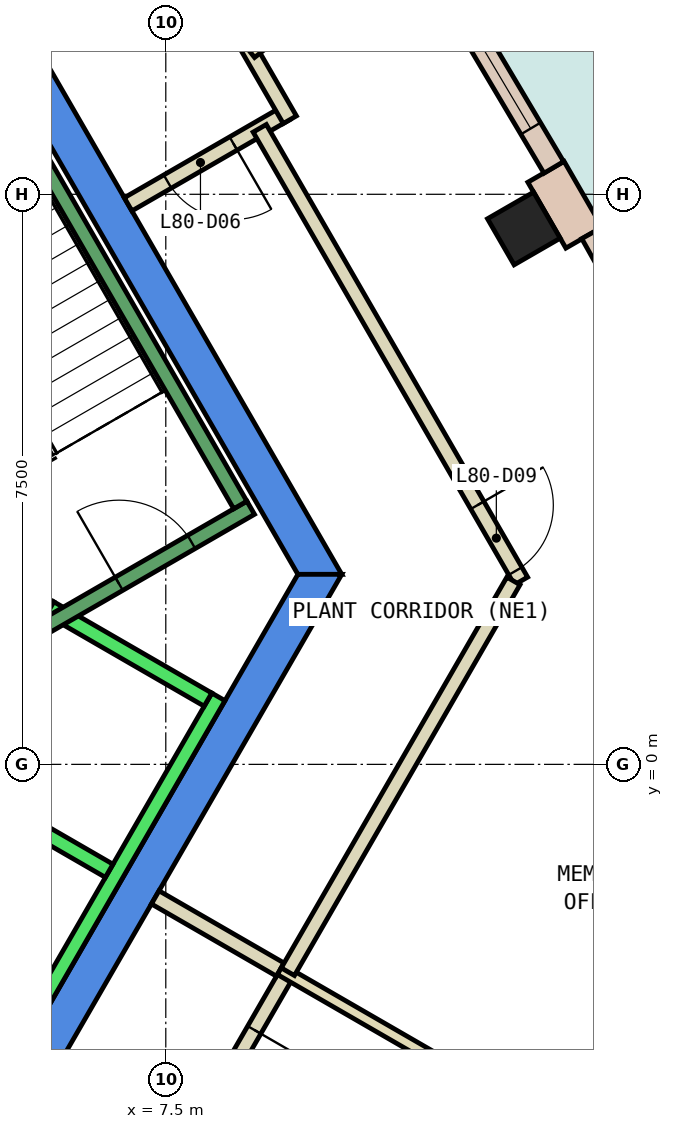
"""IFC4 building model, lengths in metres.
Left out: names, types, materials, properties, quantities, classifications, styles, units other than length and angle.
Written with IfcOpenShell. Run it as: python <this file> out.ifc"""

import sys

from ifc_helpers import new_model, si_unit, direction, frame, frame_2d, origin, origin_2d, place, context, subcontext, project, spatial, polyline, rectangle, outline, extrude, element, fill, save


model = new_model("IFC4")
c1 = context("Model", 3, precision=1e-05, world=origin(), true_north=direction((0.0, 1.0)))
c2 = subcontext(c1, "Body", "Model", "MODEL_VIEW")
j1 = project(units=[si_unit("LENGTHUNIT", "METRE"), si_unit("PLANEANGLEUNIT", "RADIAN")], contexts=[c1])
p1 = place(None, origin())
s1 = spatial("IfcSite", under=j1, at=p1, CompositionType="ELEMENT")
p2 = place(p1, origin())
s2 = spatial("IfcBuilding", under=s1, at=p2, CompositionType="ELEMENT")
p3 = place(p2, frame((0.0, 0.0, 340.4)))
s3 = spatial("IfcBuildingStorey", under=s2, at=p3, CompositionType="ELEMENT", Elevation=340.4)
p4 = place(p3, frame((12.211, 7.05, 0.0), z_axis=(0.0, 0.0, 1.0), x_axis=(-0.5, 0.866025403784, 0.0)))
e1 = element("IfcColumn", 1, at=p4, inside=s3, PredefinedType="COLUMN", context=c2, shape_type="SweptSolid", body=[
    extrude(rectangle(XDim=0.7, YDim=0.7, at=origin_2d()), origin(), (0.0, 0.0, 1.0), 4.15),
])
p5 = place(p3, frame((0.0, 0.0, -0.45)))
e2 = element("IfcWall", 2, at=p5, inside=s3, PredefinedType="SHEAR", context=c2, shape_type="SweptSolid", body=[
    extrude(outline(polyline([(5.486, 9.998), (5.053, 9.748), (9.238, 2.5), (9.815, 2.5), (5.486, 9.998)])), origin(), (0.0, 0.0, 1.0), 4.6),
])
p6 = place(p3, frame((0.0, 0.0, -0.45)))
e3 = element("IfcWall", 3, at=p6, inside=s3, PredefinedType="SHEAR", context=c2, shape_type="SweptSolid", body=[
    extrude(outline(polyline([(4.907, -6.0), (9.815, 2.5), (9.238, 2.5), (4.619, -5.5), (4.907, -6.0)])), origin(), (0.0, 0.0, 1.0), 4.6),
])
p7 = place(p3, frame((13.002, 6.929, 0.0), z_axis=(0.0, 0.0, 1.0), x_axis=(-0.49960277677, 0.866254619292, 0.0)))
e4 = element("IfcWall", 4, at=p7, inside=s3, PredefinedType="STANDARD", context=c2, shape_type="SweptSolid", body=[
    extrude(rectangle(XDim=1.001, YDim=0.55, at=frame_2d((0.5, 0.0))), origin(), (0.0, 0.0, 1.0), 4.15),
])
p8 = place(p3, frame((16.225, 1.426, 0.0), z_axis=(0.0, 0.0, 1.0), x_axis=(-0.489232514948, 0.872153396094, 0.0)))
e5 = element("IfcWall", 5, at=p8, inside=s3, PredefinedType="STANDARD", context=c2, shape_type="SweptSolid", body=[
    extrude(rectangle(XDim=6.38, YDim=0.3, at=frame_2d((3.19, 0.0))), origin(), (0.0, 0.0, 1.0), 4.15),
])
p9 = place(p8, frame((0.595, 0.0, 0.0)))
e6 = element("IfcOpeningElement", 6, at=p9, cuts=e5, PredefinedType="OPENING", context=c2, shape_type="SweptSolid", body=[
    extrude(rectangle(XDim=2.0, YDim=2.4, at=frame_2d((1.0, 1.2))), frame((0.0, 0.16, 0.0), z_axis=(0.0, -1.0, 0.0), x_axis=(1.0, 0.0, 0.0)), (0.0, 0.0, 1.0), 0.32),
])
p10 = place(p8, frame((3.785, 0.0, 0.9)))
e7 = element("IfcOpeningElement", 7, at=p10, cuts=e5, PredefinedType="OPENING", context=c2, shape_type="SweptSolid", body=[
    extrude(rectangle(XDim=2.0, YDim=3.0, at=frame_2d((1.0, 1.5))), frame((0.0, 0.16, 0.0), z_axis=(0.0, -1.0, 0.0), x_axis=(1.0, 0.0, 0.0)), (0.0, 0.0, 1.0), 0.32),
])
p11 = place(p3, frame((12.605, 7.854, 0.0), z_axis=(0.0, 0.0, 1.0), x_axis=(-0.510686403068, 0.859767060152, 0.0)))
e8 = element("IfcWall", 8, at=p11, inside=s3, PredefinedType="STANDARD", context=c2, shape_type="SweptSolid", body=[
    extrude(rectangle(XDim=6.38, YDim=0.3, at=frame_2d((3.19, 0.0))), origin(), (0.0, 0.0, 1.0), 4.15),
])
p12 = place(p11, frame((0.595, 0.0, 0.9)))
e9 = element("IfcOpeningElement", 9, at=p12, cuts=e8, PredefinedType="OPENING", context=c2, shape_type="SweptSolid", body=[
    extrude(rectangle(XDim=2.0, YDim=3.0, at=frame_2d((1.0, 1.5))), frame((0.0, 0.16, 0.0), z_axis=(0.0, -1.0, 0.0), x_axis=(1.0, 0.0, 0.0)), (0.0, 0.0, 1.0), 0.32),
])
p13 = place(p11, frame((3.785, 0.0, 0.9)))
e10 = element("IfcOpeningElement", 10, at=p13, cuts=e8, PredefinedType="OPENING", context=c2, shape_type="SweptSolid", body=[
    extrude(rectangle(XDim=2.0, YDim=3.0, at=frame_2d((1.0, 1.5))), frame((0.0, 0.16, 0.0), z_axis=(0.0, -1.0, 0.0), x_axis=(1.0, 0.0, 0.0)), (0.0, 0.0, 1.0), 0.32),
])
p14 = place(p3, frame((9.106, -2.728, 0.0), z_axis=(0.0, 0.0, 1.0), x_axis=(-0.500132879116, -0.865948672398, 0.0)))
e11 = element("IfcWall", 11, at=p14, inside=s3, PredefinedType="PARTITIONING", context=c2, shape_type="SweptSolid", body=[
    extrude(rectangle(XDim=3.879, YDim=0.2, at=frame_2d((1.939, 0.0))), origin(), (0.0, 0.0, 1.0), 4.15),
])
p15 = place(p14, frame((0.884, 0.0, 0.0)))
e12 = element("IfcOpeningElement", 12, at=p15, cuts=e11, PredefinedType="OPENING", context=c2, shape_type="SweptSolid", body=[
    extrude(rectangle(XDim=1.0, YDim=2.1, at=frame_2d((0.5, 1.05))), frame((0.0, 0.11, 0.0), z_axis=(0.0, -1.0, 0.0), x_axis=(1.0, 0.0, 0.0)), (0.0, 0.0, 1.0), 0.22),
])
p16 = place(p3, frame((7.361, -1.75, 0.0), z_axis=(0.0, 0.0, 1.0), x_axis=(0.865980106173, -0.500078449558, 0.0)))
e13 = element("IfcWall", 13, at=p16, inside=s3, PredefinedType="PARTITIONING", context=c2, shape_type="SweptSolid", body=[
    extrude(rectangle(XDim=1.9, YDim=0.2, at=frame_2d((0.95, 0.0))), origin(), (0.0, 0.0, 1.0), 4.15),
])
p17 = place(p3, frame((19.664, -8.853, 0.0), z_axis=(0.0, 0.0, 1.0), x_axis=(-0.866035935173, 0.499981758657, 0.0)))
e14 = element("IfcWall", 14, at=p17, inside=s3, PredefinedType="PARTITIONING", context=c2, shape_type="SweptSolid", body=[
    extrude(rectangle(XDim=12.307, YDim=0.15, at=frame_2d((6.153, 0.0))), origin(), (0.0, 0.0, 1.0), 4.15),
])
p18 = place(p3, frame((9.082, 8.568, 0.0), z_axis=(0.0, 0.0, 1.0), x_axis=(-0.865955154139, -0.50012165622, 0.0)))
e15 = element("IfcWall", 15, at=p18, inside=s3, PredefinedType="PARTITIONING", context=c2, shape_type="SweptSolid", body=[
    extrude(rectangle(XDim=2.4, YDim=0.2, at=frame_2d((1.2, 0.0))), origin(), (0.0, 0.0, 1.0), 4.15),
])
p19 = place(p18, frame((0.8, 0.0, 0.0)))
e16 = element("IfcOpeningElement", 16, at=p19, cuts=e15, PredefinedType="OPENING", context=c2, shape_type="SweptSolid", body=[
    extrude(rectangle(XDim=1.0, YDim=2.1, at=frame_2d((0.5, 1.05))), frame((0.0, 0.11, 0.0), z_axis=(0.0, -1.0, 0.0), x_axis=(1.0, 0.0, 0.0)), (0.0, 0.0, 1.0), 0.22),
])
p20 = place(p3, frame((5.532, 14.717, 0.0), z_axis=(0.0, 0.0, 1.0), x_axis=(0.499968011863, -0.866043871356, 0.0)))
e17 = element("IfcWall", 17, at=p20, inside=s3, PredefinedType="PARTITIONING", context=c2, shape_type="SweptSolid", body=[
    extrude(rectangle(XDim=7.201, YDim=0.2, at=frame_2d((3.6, 0.0))), origin(), (0.0, 0.0, 1.0), 4.15),
])
p21 = place(p20, frame((3.18, 0.0, 0.0)))
e18 = element("IfcOpeningElement", 18, at=p21, cuts=e17, PredefinedType="OPENING", context=c2, shape_type="SweptSolid", body=[
    extrude(rectangle(XDim=1.0, YDim=2.1, at=frame_2d((0.5, 1.05))), frame((0.0, 0.11, 0.0), z_axis=(0.0, -1.0, 0.0), x_axis=(1.0, 0.0, 0.0)), (0.0, 0.0, 1.0), 0.22),
])
p22 = place(p3, frame((8.736, 8.368, 0.0), z_axis=(0.0, 0.0, 1.0), x_axis=(0.499995994493, -0.866027716353, 0.0)))
e19 = element("IfcWall", 19, at=p22, inside=s3, PredefinedType="PARTITIONING", context=c2, shape_type="SweptSolid", body=[
    extrude(rectangle(XDim=6.876, YDim=0.2, at=frame_2d((3.438, 0.0))), origin(), (0.0, 0.0, 1.0), 4.15),
])
p23 = place(p22, frame((5.726, 0.0, 0.0)))
e20 = element("IfcOpeningElement", 20, at=p23, cuts=e19, PredefinedType="OPENING", context=c2, shape_type="SweptSolid", body=[
    extrude(rectangle(XDim=1.0, YDim=2.1, at=frame_2d((0.5, 1.05))), frame((0.0, 0.11, 0.0), z_axis=(0.0, -1.0, 0.0), x_axis=(1.0, 0.0, 0.0)), (0.0, 0.0, 1.0), 0.22),
])
p24 = place(p3, frame((12.074, 2.413, 0.0), z_axis=(0.0, 0.0, 1.0), x_axis=(-0.499974029402, -0.866040397397, 0.0)))
e21 = element("IfcWall", 21, at=p24, inside=s3, PredefinedType="PARTITIONING", context=c2, shape_type="SweptSolid", body=[
    extrude(rectangle(XDim=5.936, YDim=0.2, at=frame_2d((2.968, 0.0))), origin(), (0.0, 0.0, 1.0), 4.15),
])
p25 = place(p3, frame((10.617, 10.906, 0.0), z_axis=(0.0, 0.0, 1.0), x_axis=(-0.784159528351, -0.620559291363, 0.0)))
e22 = element("IfcWall", 22, at=p25, inside=s3, PredefinedType="PARTITIONING", context=c2, shape_type="SweptSolid", body=[
    extrude(rectangle(XDim=2.525, YDim=0.1, at=frame_2d((1.262, 0.0))), origin(), (0.0, 0.0, 1.0), 4.15),
])
p26 = place(p3, frame((3.24, -2.488, 0.0), z_axis=(0.0, 0.0, 1.0), x_axis=(0.500034260056, 0.866005622828, 0.0)))
e23 = element("IfcWall", 23, at=p26, inside=s3, PredefinedType="STANDARD", context=c2, shape_type="SweptSolid", body=[
    extrude(rectangle(XDim=5.399, YDim=0.2, at=frame_2d((2.7, 0.0))), origin(), (0.0, 0.0, 1.0), 4.15),
])
p27 = place(p26, frame((3.225, 0.0, 0.0)))
e24 = element("IfcOpeningElement", 24, at=p27, cuts=e23, PredefinedType="OPENING", context=c2, shape_type="SweptSolid", body=[
    extrude(rectangle(XDim=1.1, YDim=2.1, at=frame_2d((0.55, 1.05))), frame((0.0, 0.11, 0.0), z_axis=(0.0, -1.0, 0.0), x_axis=(1.0, 0.0, 0.0)), (0.0, 0.0, 1.0), 0.22),
])
p28 = place(p26, frame((1.225, 0.0, 0.0)))
e25 = element("IfcOpeningElement", 25, at=p28, cuts=e23, PredefinedType="OPENING", context=c2, shape_type="SweptSolid", body=[
    extrude(rectangle(XDim=1.1, YDim=2.1, at=frame_2d((0.55, 1.05))), frame((0.0, 0.11, 0.0), z_axis=(0.0, -1.0, 0.0), x_axis=(1.0, 0.0, 0.0)), (0.0, 0.0, 1.0), 0.22),
])
p29 = place(p3, frame((5.492, -3.788, 0.0), z_axis=(0.0, 0.0, 1.0), x_axis=(0.500034260056, 0.866005622828, 0.0)))
e26 = element("IfcWall", 26, at=p29, inside=s3, PredefinedType="STANDARD", context=c2, shape_type="SweptSolid", body=[
    extrude(rectangle(XDim=5.399, YDim=0.2, at=frame_2d((2.7, 0.0))), origin(), (0.0, 0.0, 1.0), 4.15),
])
for number, where, z_axis, x_axis in (
    (27, (4.677, -0.2, 0.0), (0.0, 0.0, 1.0), (0.866, -0.5, 0.0)),
    (28, (5.977, 2.052, 0.0), (0.0, 0.0, 1.0), (0.866, -0.5, 0.0)),
):
    element("IfcWall", number, at=place(p3, frame(where, z_axis=z_axis, x_axis=x_axis)), inside=s3, PredefinedType="STANDARD", context=c2, shape_type="SweptSolid", body=[
        extrude(rectangle(XDim=2.399, YDim=0.2, at=frame_2d((1.2, 0.0))), origin(), (0.0, 0.0, 1.0), 4.15),
    ])
p30 = place(p3, frame((4.806, 1.176, 0.0), z_axis=(0.0, 0.0, 1.0), x_axis=(0.866059941101, 0.499940174841, 0.0)))
e29 = element("IfcWall", 29, at=p30, inside=s3, PredefinedType="STANDARD", context=c2, shape_type="SweptSolid", body=[
    extrude(rectangle(XDim=4.4, YDim=0.2, at=frame_2d((2.2, 0.0))), origin(), (0.0, 0.0, 1.0), 4.15),
])
p31 = place(p30, frame((2.4, 0.0, 0.0)))
e30 = element("IfcOpeningElement", 30, at=p31, cuts=e29, PredefinedType="OPENING", context=c2, shape_type="SweptSolid", body=[
    extrude(rectangle(XDim=1.1, YDim=2.2, at=frame_2d((0.55, 1.1))), frame((0.0, 0.11, 0.0), z_axis=(0.0, -1.0, 0.0), x_axis=(1.0, 0.0, 0.0)), (0.0, 0.0, 1.0), 0.22),
])
p32 = place(p3, frame((8.48, 3.412, 0.0), z_axis=(0.0, 0.0, 1.0), x_axis=(-0.499978703459, 0.866037698999, 0.0)))
e31 = element("IfcWall", 31, at=p32, inside=s3, PredefinedType="STANDARD", context=c2, shape_type="SweptSolid", body=[
    extrude(rectangle(XDim=6.9, YDim=0.2, at=frame_2d((3.45, 0.0))), origin(), (0.0, 0.0, 1.0), 4.15),
])
p33 = place(p12, origin())
e32 = element("IfcWindow", 32, at=p33, inside=s3, PartitioningType="SINGLE_PANEL", PredefinedType="WINDOW", context=c2, shape_type="SweptSolid", body=[
    extrude(rectangle(XDim=2.0, YDim=3.0, at=frame_2d((1.0, 1.5))), frame((0.0, 0.03, 0.0), z_axis=(0.0, -1.0, 0.0), x_axis=(1.0, 0.0, 0.0)), (0.0, 0.0, 1.0), 0.06),
])
fill(e9, e32)
p34 = place(p15, origin())
e33 = element("IfcDoor", 33, at=p34, inside=s3, OperationType="SINGLE_SWING_LEFT", PredefinedType="DOOR", context=c2, shape_type="SweptSolid", body=[
    extrude(rectangle(XDim=1.0, YDim=2.1, at=frame_2d((0.5, 1.05))), frame((0.0, 0.025, 0.0), z_axis=(0.0, -1.0, 0.0), x_axis=(1.0, 0.0, 0.0)), (0.0, 0.0, 1.0), 0.05),
])
fill(e12, e33)
p35 = place(p19, origin())
e34 = element("IfcDoor", 34, at=p35, inside=s3, OperationType="SINGLE_SWING_LEFT", PredefinedType="DOOR", context=c2, shape_type="SweptSolid", body=[
    extrude(rectangle(XDim=1.0, YDim=2.1, at=frame_2d((0.5, 1.05))), frame((0.0, 0.025, 0.0), z_axis=(0.0, -1.0, 0.0), x_axis=(1.0, 0.0, 0.0)), (0.0, 0.0, 1.0), 0.05),
])
fill(e16, e34)
p36 = place(p23, origin())
e35 = element("IfcDoor", 35, at=p36, inside=s3, OperationType="SINGLE_SWING_RIGHT", PredefinedType="DOOR", context=c2, shape_type="SweptSolid", body=[
    extrude(rectangle(XDim=1.0, YDim=2.1, at=frame_2d((0.5, 1.05))), frame((0.0, 0.025, 0.0), z_axis=(0.0, -1.0, 0.0), x_axis=(1.0, 0.0, 0.0)), (0.0, 0.0, 1.0), 0.05),
])
fill(e20, e35)
p37 = place(p31, origin())
e36 = element("IfcDoor", 36, at=p37, inside=s3, OperationType="SINGLE_SWING_LEFT", PredefinedType="DOOR", context=c2, shape_type="SweptSolid", body=[
    extrude(rectangle(XDim=1.1, YDim=2.2, at=frame_2d((0.55, 1.1))), frame((0.0, 0.025, 0.0), z_axis=(0.0, -1.0, 0.0), x_axis=(1.0, 0.0, 0.0)), (0.0, 0.0, 1.0), 0.05),
])
fill(e30, e36)
save(model, sys.argv[1])
